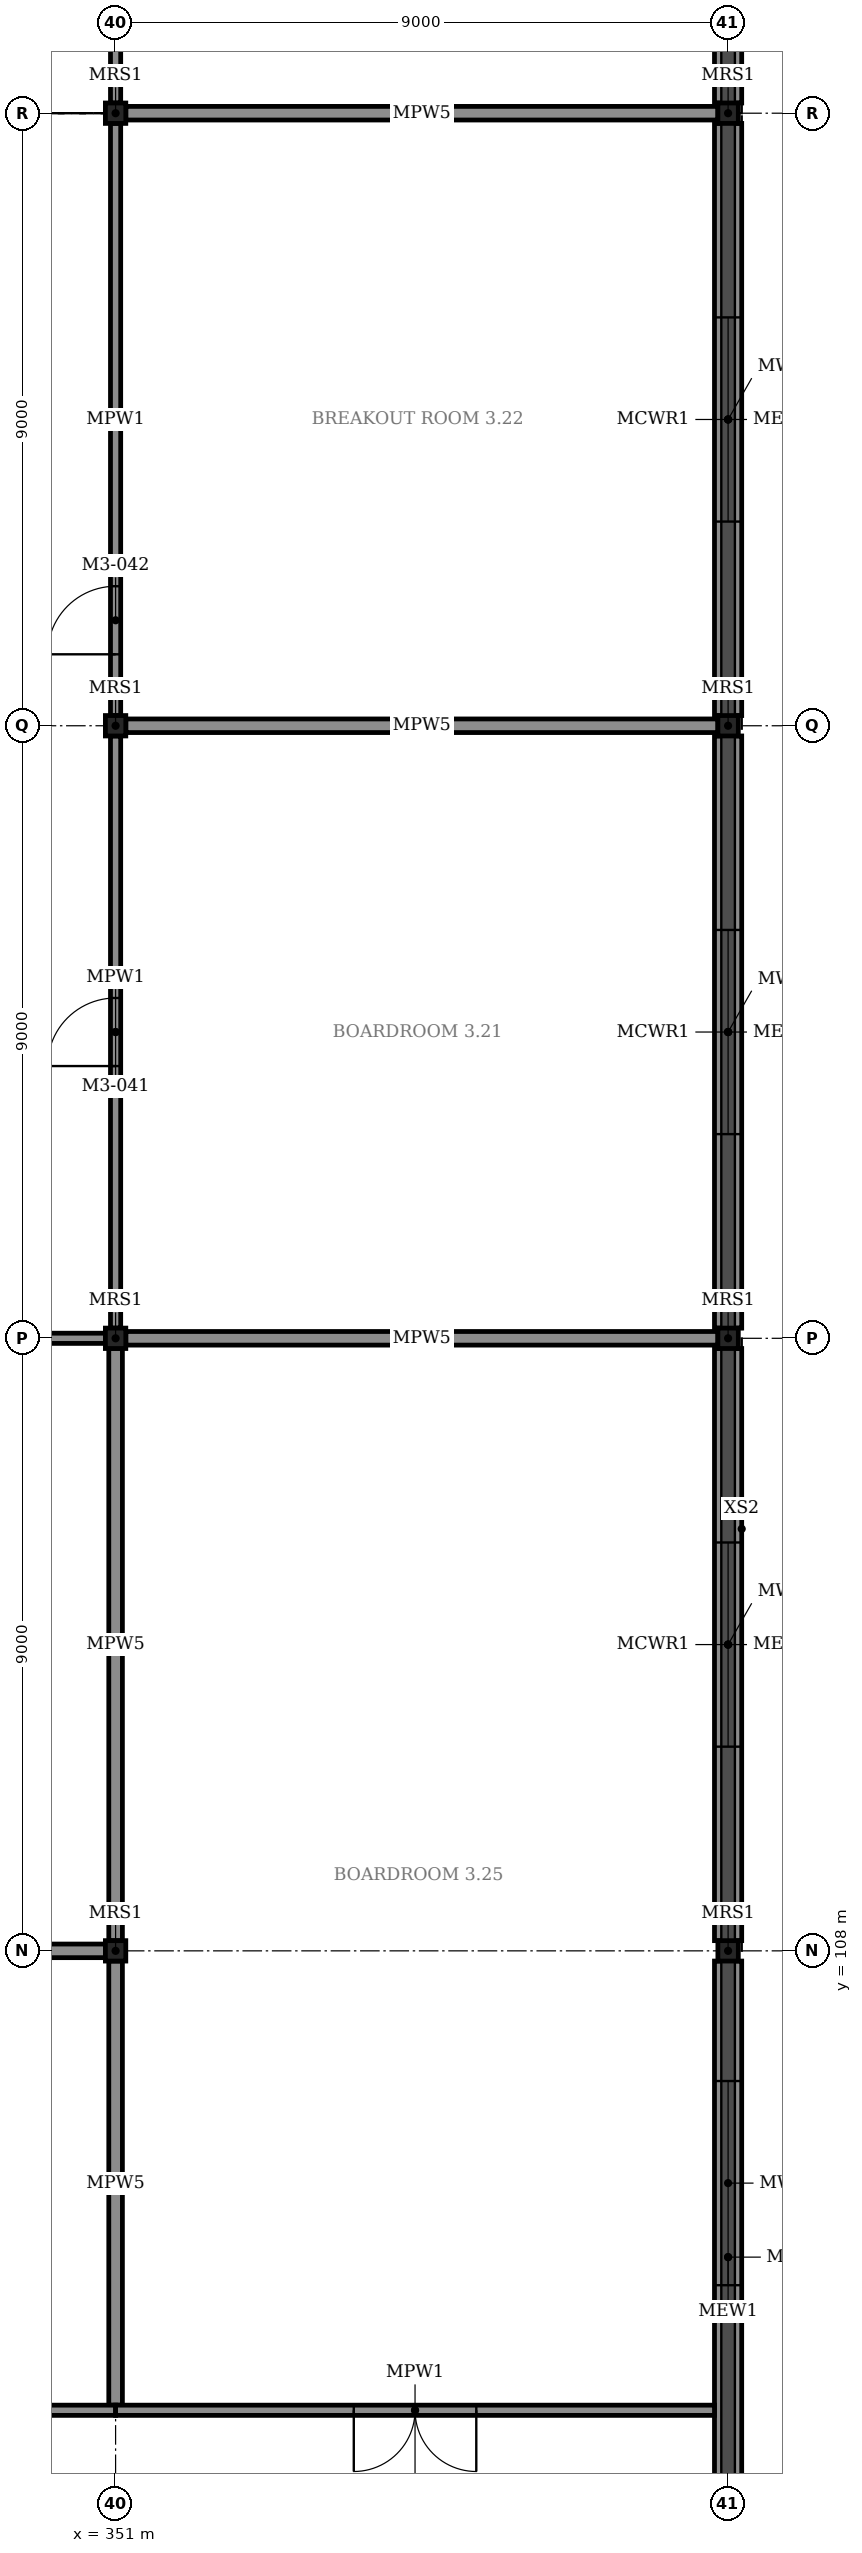
"""IFC4 building model, lengths in metres.
Left out: names, types, materials, properties, quantities, classifications, styles, units other than length and angle.
Written with IfcOpenShell. Run it as: python <this file> out.ifc"""

import sys

from ifc_helpers import new_model, si_unit, direction, frame, frame_2d, origin, origin_2d, place, context, subcontext, project, spatial, rectangle, hollow_rectangle, extrude, element, fill, save


model = new_model("IFC4")
c1 = context("Model", 3, precision=1e-05, world=origin(), true_north=direction((0.0, 1.0)))
c2 = subcontext(c1, "Body", "Model", "MODEL_VIEW")
j1 = project(units=[si_unit("LENGTHUNIT", "METRE"), si_unit("PLANEANGLEUNIT", "RADIAN")], contexts=[c1])
p1 = place(None, origin())
s1 = spatial("IfcSite", under=j1, at=p1, CompositionType="ELEMENT")
p2 = place(p1, origin())
s2 = spatial("IfcBuilding", under=s1, at=p2, CompositionType="ELEMENT")
p3 = place(p2, frame((0.0, 0.0, 17.0)))
s3 = spatial("IfcBuildingStorey", under=s2, at=p3, CompositionType="ELEMENT", Elevation=17.0)
for number, where, z_axis, x_axis in (
    (1, (351.0, 108.0, 0.0), (0.0, 0.0, 1.0), (1.0, 0.0, 0.0)),
    (2, (351.0, 117.0, 0.0), (0.0, 0.0, 1.0), (1.0, 0.0, 0.0)),
    (3, (351.0, 126.0, 0.0), (0.0, 0.0, 1.0), (1.0, 0.0, 0.0)),
    (4, (351.0, 135.0, 0.0), (0.0, 0.0, 1.0), (1.0, 0.0, 0.0)),
    (5, (360.0, 108.0, 0.0), (0.0, 0.0, 1.0), (1.0, 0.0, 0.0)),
    (6, (360.0, 117.0, 0.0), (0.0, 0.0, 1.0), (1.0, 0.0, 0.0)),
    (7, (360.0, 126.0, 0.0), (0.0, 0.0, 1.0), (1.0, 0.0, 0.0)),
    (8, (360.0, 135.0, 0.0), (0.0, 0.0, 1.0), (1.0, 0.0, 0.0)),
):
    element("IfcColumn", number, at=place(p3, frame(where, z_axis=z_axis, x_axis=x_axis)), inside=s3, PredefinedType="COLUMN", context=c2, shape_type="SweptSolid", body=[
        extrude(hollow_rectangle(XDim=0.3, YDim=0.3, WallThickness=0.012, InnerFilletRadius=0.024, OuterFilletRadius=0.036, at=origin_2d()), origin(), (0.0, 0.0, 1.0), 3.1),
    ])
p4 = place(p3, frame((360.0, 99.15, 0.0), z_axis=(0.0, 0.0, 1.0), x_axis=(0.0, 1.0, 0.0)))
e9 = element("IfcWall", 9, at=p4, inside=s3, PredefinedType="STANDARD", context=c2, shape_type="SweptSolid", body=[
    extrude(rectangle(XDim=8.7, YDim=0.4, at=frame_2d((4.35, 0.0))), origin(), (0.0, 0.0, 1.0), 3.3),
])
p5 = place(p4, frame((3.938, 0.0, 0.9)))
e10 = element("IfcOpeningElement", 10, at=p5, cuts=e9, PredefinedType="OPENING", context=c2, shape_type="SweptSolid", body=[
    extrude(rectangle(XDim=3.0, YDim=2.1, at=frame_2d((1.5, 1.05))), frame((0.0, 0.21, 0.0), z_axis=(0.0, -1.0, 0.0), x_axis=(1.0, 0.0, 0.0)), (0.0, 0.0, 1.0), 0.42),
])
p6 = place(p3, frame((360.0, 108.15, 0.0), z_axis=(0.0, 0.0, 1.0), x_axis=(0.0, 1.0, 0.0)))
e11 = element("IfcWall", 11, at=p6, inside=s3, PredefinedType="STANDARD", context=c2, shape_type="SweptSolid", body=[
    extrude(rectangle(XDim=8.7, YDim=0.4, at=frame_2d((4.35, 0.0))), origin(), (0.0, 0.0, 1.0), 3.3),
])
p7 = place(p6, frame((2.85, 0.0, 0.9)))
e12 = element("IfcOpeningElement", 12, at=p7, cuts=e11, PredefinedType="OPENING", context=c2, shape_type="SweptSolid", body=[
    extrude(rectangle(XDim=3.0, YDim=2.1, at=frame_2d((1.5, 1.05))), frame((0.0, 0.21, 0.0), z_axis=(0.0, -1.0, 0.0), x_axis=(1.0, 0.0, 0.0)), (0.0, 0.0, 1.0), 0.42),
])
p8 = place(p3, frame((360.0, 117.15, 0.0), z_axis=(0.0, 0.0, 1.0), x_axis=(0.0, 1.0, 0.0)))
e13 = element("IfcWall", 13, at=p8, inside=s3, PredefinedType="STANDARD", context=c2, shape_type="SweptSolid", body=[
    extrude(rectangle(XDim=8.7, YDim=0.4, at=frame_2d((4.35, 0.0))), origin(), (0.0, 0.0, 1.0), 3.3),
])
p9 = place(p8, frame((2.85, 0.0, 0.9)))
e14 = element("IfcOpeningElement", 14, at=p9, cuts=e13, PredefinedType="OPENING", context=c2, shape_type="SweptSolid", body=[
    extrude(rectangle(XDim=3.0, YDim=2.1, at=frame_2d((1.5, 1.05))), frame((0.0, 0.21, 0.0), z_axis=(0.0, -1.0, 0.0), x_axis=(1.0, 0.0, 0.0)), (0.0, 0.0, 1.0), 0.42),
])
p10 = place(p3, frame((360.0, 126.15, 0.0), z_axis=(0.0, 0.0, 1.0), x_axis=(0.0, 1.0, 0.0)))
e15 = element("IfcWall", 15, at=p10, inside=s3, PredefinedType="STANDARD", context=c2, shape_type="SweptSolid", body=[
    extrude(rectangle(XDim=8.7, YDim=0.4, at=frame_2d((4.35, 0.0))), origin(), (0.0, 0.0, 1.0), 3.3),
])
p11 = place(p10, frame((2.85, 0.0, 0.9)))
e16 = element("IfcOpeningElement", 16, at=p11, cuts=e15, PredefinedType="OPENING", context=c2, shape_type="SweptSolid", body=[
    extrude(rectangle(XDim=3.0, YDim=2.1, at=frame_2d((1.5, 1.05))), frame((0.0, 0.21, 0.0), z_axis=(0.0, -1.0, 0.0), x_axis=(1.0, 0.0, 0.0)), (0.0, 0.0, 1.0), 0.42),
])
p12 = place(p3, frame((360.0, 135.15, 0.0), z_axis=(0.0, 0.0, 1.0), x_axis=(0.0, 1.0, 0.0)))
e17 = element("IfcWall", 17, at=p12, inside=s3, PredefinedType="STANDARD", context=c2, shape_type="SweptSolid", body=[
    extrude(rectangle(XDim=8.7, YDim=0.4, at=frame_2d((4.35, 0.0))), origin(), (0.0, 0.0, 1.0), 3.3),
])
p13 = place(p12, frame((2.85, 0.0, 0.9)))
e18 = element("IfcOpeningElement", 18, at=p13, cuts=e17, PredefinedType="OPENING", context=c2, shape_type="SweptSolid", body=[
    extrude(rectangle(XDim=3.0, YDim=2.1, at=frame_2d((1.5, 1.05))), frame((0.0, 0.21, 0.0), z_axis=(0.0, -1.0, 0.0), x_axis=(1.0, 0.0, 0.0)), (0.0, 0.0, 1.0), 0.42),
])
p14 = place(p3, frame((333.0, 101.25, 0.0), z_axis=(0.0, 0.0, 1.0), x_axis=(1.0, 0.0, 0.0)))
e19 = element("IfcWall", 19, at=p14, inside=s3, PredefinedType="PARTITIONING", context=c2, shape_type="SweptSolid", body=[
    extrude(rectangle(XDim=18.0, YDim=0.15, at=frame_2d((9.0, 0.0))), origin(), (0.0, 0.0, 1.0), 3.0),
])
p15 = place(p14, frame((8.1, 0.0, 0.0)))
e20 = element("IfcOpeningElement", 20, at=p15, cuts=e19, PredefinedType="OPENING", context=c2, shape_type="SweptSolid", body=[
    extrude(rectangle(XDim=1.8, YDim=2.4, at=frame_2d((0.9, 1.2))), frame((0.0, 0.085, 0.0), z_axis=(0.0, -1.0, 0.0), x_axis=(1.0, 0.0, 0.0)), (0.0, 0.0, 1.0), 0.17),
])
p16 = place(p3, frame((342.15, 108.0, 0.0), z_axis=(0.0, 0.0, 1.0), x_axis=(1.0, 0.0, 0.0)))
e21 = element("IfcWall", 21, at=p16, inside=s3, PredefinedType="PARTITIONING", context=c2, shape_type="SweptSolid", body=[
    extrude(rectangle(XDim=8.7, YDim=0.2, at=frame_2d((4.35, 0.0))), origin(), (0.0, 0.0, 1.0), 3.0),
])
p17 = place(p3, frame((351.0, 101.325, 0.0), z_axis=(0.0, 0.0, 1.0), x_axis=(0.0, 1.0, 0.0)))
e22 = element("IfcWall", 22, at=p17, inside=s3, PredefinedType="PARTITIONING", context=c2, shape_type="SweptSolid", body=[
    extrude(rectangle(XDim=6.525, YDim=0.2, at=frame_2d((3.263, 0.0))), origin(), (0.0, 0.0, 1.0), 3.0),
])
p18 = place(p3, frame((342.15, 117.0, 0.0), z_axis=(0.0, 0.0, 1.0), x_axis=(1.0, 0.0, 0.0)))
e23 = element("IfcWall", 23, at=p18, inside=s3, PredefinedType="PARTITIONING", context=c2, shape_type="SweptSolid", body=[
    extrude(rectangle(XDim=8.7, YDim=0.15, at=frame_2d((4.35, 0.0))), origin(), (0.0, 0.0, 1.0), 3.0),
])
for number, where, z_axis, x_axis in (
    (24, (351.0, 108.15, 0.0), (0.0, 0.0, 1.0), (0.0, 1.0, 0.0)),
    (25, (351.15, 117.0, 0.0), (0.0, 0.0, 1.0), (1.0, 0.0, 0.0)),
    (26, (351.15, 126.0, 0.0), (0.0, 0.0, 1.0), (1.0, 0.0, 0.0)),
):
    element("IfcWall", number, at=place(p3, frame(where, z_axis=z_axis, x_axis=x_axis)), inside=s3, PredefinedType="PARTITIONING", context=c2, shape_type="SweptSolid", body=[
        extrude(rectangle(XDim=8.7, YDim=0.2, at=frame_2d((4.35, 0.0))), origin(), (0.0, 0.0, 1.0), 3.0),
    ])
p19 = place(p3, frame((351.0, 117.15, 0.0), z_axis=(0.0, 0.0, 1.0), x_axis=(0.0, 1.0, 0.0)))
e27 = element("IfcWall", 27, at=p19, inside=s3, PredefinedType="PARTITIONING", context=c2, shape_type="SweptSolid", body=[
    extrude(rectangle(XDim=8.7, YDim=0.15, at=frame_2d((4.35, 0.0))), origin(), (0.0, 0.0, 1.0), 3.0),
])
p20 = place(p19, frame((3.85, 0.0, 0.0)))
e28 = element("IfcOpeningElement", 28, at=p20, cuts=e27, PredefinedType="OPENING", context=c2, shape_type="SweptSolid", body=[
    extrude(rectangle(XDim=1.0, YDim=2.4, at=frame_2d((0.5, 1.2))), frame((0.0, 0.085, 0.0), z_axis=(0.0, -1.0, 0.0), x_axis=(1.0, 0.0, 0.0)), (0.0, 0.0, 1.0), 0.17),
])
p21 = place(p3, frame((351.15, 135.0, 0.0), z_axis=(0.0, 0.0, 1.0), x_axis=(1.0, 0.0, 0.0)))
e29 = element("IfcWall", 29, at=p21, inside=s3, PredefinedType="PARTITIONING", context=c2, shape_type="SweptSolid", body=[
    extrude(rectangle(XDim=8.7, YDim=0.2, at=frame_2d((4.35, 0.0))), origin(), (0.0, 0.0, 1.0), 3.0),
])
p22 = place(p3, frame((351.0, 126.15, 0.0), z_axis=(0.0, 0.0, 1.0), x_axis=(0.0, 1.0, 0.0)))
e30 = element("IfcWall", 30, at=p22, inside=s3, PredefinedType="PARTITIONING", context=c2, shape_type="SweptSolid", body=[
    extrude(rectangle(XDim=8.7, YDim=0.15, at=frame_2d((4.35, 0.0))), origin(), (0.0, 0.0, 1.0), 3.0),
])
p23 = place(p22, frame((0.9, 0.0, 0.0)))
e31 = element("IfcOpeningElement", 31, at=p23, cuts=e30, PredefinedType="OPENING", context=c2, shape_type="SweptSolid", body=[
    extrude(rectangle(XDim=1.0, YDim=2.4, at=frame_2d((0.5, 1.2))), frame((0.0, 0.085, 0.0), z_axis=(0.0, -1.0, 0.0), x_axis=(1.0, 0.0, 0.0)), (0.0, 0.0, 1.0), 0.17),
])
p24 = place(p3, frame((351.0, 135.15, 0.0), z_axis=(0.0, 0.0, 1.0), x_axis=(0.0, 1.0, 0.0)))
e32 = element("IfcWall", 32, at=p24, inside=s3, PredefinedType="PARTITIONING", context=c2, shape_type="SweptSolid", body=[
    extrude(rectangle(XDim=8.7, YDim=0.15, at=frame_2d((4.35, 0.0))), origin(), (0.0, 0.0, 1.0), 3.0),
])
p25 = place(p24, frame((6.0, 0.0, 0.0)))
e33 = element("IfcOpeningElement", 33, at=p25, cuts=e32, PredefinedType="OPENING", context=c2, shape_type="SweptSolid", body=[
    extrude(rectangle(XDim=1.8, YDim=2.4, at=frame_2d((0.9, 1.2))), frame((0.0, 0.085, 0.0), z_axis=(0.0, -1.0, 0.0), x_axis=(1.0, 0.0, 0.0)), (0.0, 0.0, 1.0), 0.17),
])
p26 = place(p3, frame((351.0, 101.25, 0.0), z_axis=(0.0, 0.0, 1.0), x_axis=(1.0, 0.0, 0.0)))
e34 = element("IfcWall", 34, at=p26, inside=s3, PredefinedType="PARTITIONING", context=c2, shape_type="SweptSolid", body=[
    extrude(rectangle(XDim=8.8, YDim=0.15, at=frame_2d((4.4, 0.0))), origin(), (0.0, 0.0, 1.0), 3.0),
])
p27 = place(p26, frame((3.5, 0.0, 0.0)))
e35 = element("IfcOpeningElement", 35, at=p27, cuts=e34, PredefinedType="OPENING", context=c2, shape_type="SweptSolid", body=[
    extrude(rectangle(XDim=1.8, YDim=2.4, at=frame_2d((0.9, 1.2))), frame((0.0, 0.085, 0.0), z_axis=(0.0, -1.0, 0.0), x_axis=(1.0, 0.0, 0.0)), (0.0, 0.0, 1.0), 0.17),
])
p28 = place(p5, origin())
e36 = element("IfcWindow", 36, at=p28, inside=s3, PartitioningType="TRIPLE_PANEL_VERTICAL", PredefinedType="WINDOW", context=c2, shape_type="SweptSolid", body=[
    extrude(rectangle(XDim=3.0, YDim=2.1, at=frame_2d((1.5, 1.05))), frame((0.0, 0.03, 0.0), z_axis=(0.0, -1.0, 0.0), x_axis=(1.0, 0.0, 0.0)), (0.0, 0.0, 1.0), 0.06),
])
fill(e10, e36)
p29 = place(p7, origin())
e37 = element("IfcWindow", 37, at=p29, inside=s3, PartitioningType="TRIPLE_PANEL_VERTICAL", PredefinedType="WINDOW", context=c2, shape_type="SweptSolid", body=[
    extrude(rectangle(XDim=3.0, YDim=2.1, at=frame_2d((1.5, 1.05))), frame((0.0, 0.03, 0.0), z_axis=(0.0, -1.0, 0.0), x_axis=(1.0, 0.0, 0.0)), (0.0, 0.0, 1.0), 0.06),
])
fill(e12, e37)
p30 = place(p9, origin())
e38 = element("IfcWindow", 38, at=p30, inside=s3, PartitioningType="TRIPLE_PANEL_VERTICAL", PredefinedType="WINDOW", context=c2, shape_type="SweptSolid", body=[
    extrude(rectangle(XDim=3.0, YDim=2.1, at=frame_2d((1.5, 1.05))), frame((0.0, 0.03, 0.0), z_axis=(0.0, -1.0, 0.0), x_axis=(1.0, 0.0, 0.0)), (0.0, 0.0, 1.0), 0.06),
])
fill(e14, e38)
p31 = place(p11, origin())
e39 = element("IfcWindow", 39, at=p31, inside=s3, PartitioningType="TRIPLE_PANEL_VERTICAL", PredefinedType="WINDOW", context=c2, shape_type="SweptSolid", body=[
    extrude(rectangle(XDim=3.0, YDim=2.1, at=frame_2d((1.5, 1.05))), frame((0.0, 0.03, 0.0), z_axis=(0.0, -1.0, 0.0), x_axis=(1.0, 0.0, 0.0)), (0.0, 0.0, 1.0), 0.06),
])
fill(e16, e39)
p32 = place(p20, origin())
e40 = element("IfcDoor", 40, at=p32, inside=s3, OperationType="SINGLE_SWING_LEFT", PredefinedType="DOOR", context=c2, shape_type="SweptSolid", body=[
    extrude(rectangle(XDim=1.0, YDim=2.4, at=frame_2d((0.5, 1.2))), frame((0.0, 0.025, 0.0), z_axis=(0.0, -1.0, 0.0), x_axis=(1.0, 0.0, 0.0)), (0.0, 0.0, 1.0), 0.05),
])
fill(e28, e40)
p33 = place(p23, origin())
e41 = element("IfcDoor", 41, at=p33, inside=s3, OperationType="SINGLE_SWING_LEFT", PredefinedType="DOOR", context=c2, shape_type="SweptSolid", body=[
    extrude(rectangle(XDim=1.0, YDim=2.4, at=frame_2d((0.5, 1.2))), frame((0.0, 0.025, 0.0), z_axis=(0.0, -1.0, 0.0), x_axis=(1.0, 0.0, 0.0)), (0.0, 0.0, 1.0), 0.05),
])
fill(e31, e41)
p34 = place(p27, frame((1.8, 0.0, 0.0), z_axis=(0.0, 0.0, 1.0), x_axis=(-1.0, 0.0, 0.0)))
e42 = element("IfcDoor", 42, at=p34, inside=s3, OperationType="DOUBLE_DOOR_SINGLE_SWING", PredefinedType="DOOR", context=c2, shape_type="SweptSolid", body=[
    extrude(rectangle(XDim=1.8, YDim=2.4, at=frame_2d((0.9, 1.2))), frame((0.0, 0.025, 0.0), z_axis=(0.0, -1.0, 0.0), x_axis=(1.0, 0.0, 0.0)), (0.0, 0.0, 1.0), 0.05),
])
fill(e35, e42)
save(model, sys.argv[1])
